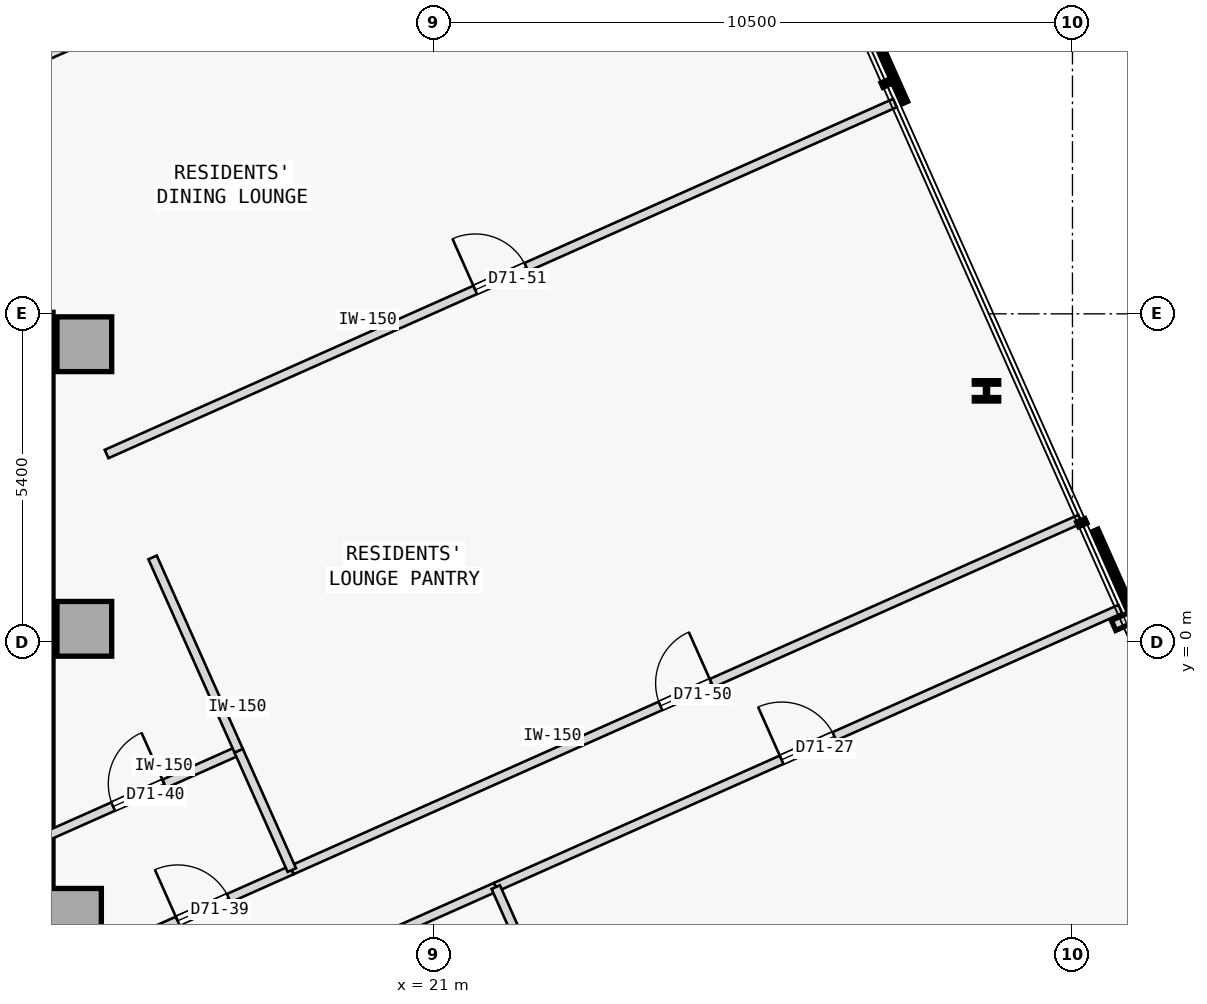
"""IFC4 building model, lengths in metres.
Left out: names, types, materials, properties, quantities, classifications, styles, units other than length and angle.
Written with IfcOpenShell. Run it as: python <this file> out.ifc"""

import sys

from ifc_helpers import new_model, si_unit, direction, frame, frame_2d, origin, origin_2d, place, context, subcontext, project, spatial, rectangle, i_section, extrude, element, fill, save


model = new_model("IFC4")
c1 = context("Model", 3, precision=1e-05, world=origin(), true_north=direction((0.0, 1.0)))
c2 = subcontext(c1, "Body", "Model", "MODEL_VIEW")
j1 = project(units=[si_unit("LENGTHUNIT", "METRE"), si_unit("PLANEANGLEUNIT", "RADIAN")], contexts=[c1])
p1 = place(None, origin())
s1 = spatial("IfcSite", under=j1, at=p1, CompositionType="ELEMENT")
p2 = place(p1, origin())
s2 = spatial("IfcBuilding", under=s1, at=p2, CompositionType="ELEMENT")
p3 = place(p2, frame((0.0, 0.0, 265.55)))
s3 = spatial("IfcBuildingStorey", under=s2, at=p3, CompositionType="ELEMENT", Elevation=265.55)
for number, where, z_axis, x_axis in (
    (1, (15.25, 4.9, 0.0), (0.0, 0.0, 1.0), (1.0, 0.0, 0.0)),
    (2, (15.25, 0.22, 0.0), (0.0, 0.0, 1.0), (1.0, 0.0, 0.0)),
    (3, (15.08, -4.5, 0.0), (0.0, 0.0, 1.0), (1.0, 0.0, 0.0)),
):
    element("IfcColumn", number, at=place(p3, frame(where, z_axis=z_axis, x_axis=x_axis)), inside=s3, PredefinedType="COLUMN", context=c2, shape_type="SweptSolid", body=[
        extrude(rectangle(XDim=0.9, YDim=0.9, at=origin_2d()), origin(), (0.0, 0.0, 1.0), 3.35),
    ])
p4 = place(p3, frame((14.56, -5.425, 0.0), z_axis=(0.0, 0.0, 1.0), x_axis=(0.0, 1.0, 0.0)))
e4 = element("IfcWall", 4, at=p4, inside=s3, PredefinedType="SHEAR", context=c2, shape_type="SweptSolid", body=[
    extrude(rectangle(XDim=10.85, YDim=0.35, at=frame_2d((5.425, 0.0))), origin(), (0.0, 0.0, 1.0), 3.125),
])
p5 = place(p3, frame((30.086, 4.133, 0.0), z_axis=(0.0, 0.0, 1.0), x_axis=(1.0, 0.0, 0.0)))
e5 = element("IfcColumn", 5, at=p5, inside=s3, PredefinedType="COLUMN", context=c2, shape_type="SweptSolid", body=[
    extrude(i_section(OverallWidth=0.401, OverallDepth=0.335, WebThickness=0.036, FlangeThickness=0.058, FilletRadius=0.015, at=origin_2d()), origin(), (0.0, 0.0, 1.0), 3.35),
])
p6 = place(p3, frame((22.016, -4.027, 0.0), z_axis=(0.0, 0.0, 1.0), x_axis=(0.913548968583, 0.406728757282, 0.0)))
e6 = element("IfcWall", 6, at=p6, inside=s3, PredefinedType="PARTITIONING", context=c2, shape_type="SweptSolid", body=[
    extrude(rectangle(XDim=11.242, YDim=0.15, at=frame_2d((5.621, 0.0))), origin(), (0.0, 0.0, 1.0), 3.125),
])
p7 = place(p6, frame((5.146, 0.0, 0.0)))
e7 = element("IfcOpeningElement", 7, at=p7, cuts=e6, PredefinedType="OPENING", context=c2, shape_type="SweptSolid", body=[
    extrude(rectangle(XDim=0.95, YDim=2.15, at=frame_2d((0.475, 1.075))), frame((0.0, 0.085, 0.0), z_axis=(0.0, -1.0, 0.0), x_axis=(1.0, 0.0, 0.0)), (0.0, 0.0, 1.0), 0.17),
])
p8 = place(p3, frame((18.818, -5.451, 0.0), z_axis=(0.0, 0.0, 1.0), x_axis=(0.913538066796, 0.406753242783, 0.0)))
e8 = element("IfcWall", 8, at=p8, inside=s3, PredefinedType="PARTITIONING", context=c2, shape_type="SweptSolid", body=[
    extrude(rectangle(XDim=3.5, YDim=0.15, at=frame_2d((1.75, 0.0))), origin(), (0.0, 0.0, 1.0), 3.125),
])
p9 = place(p3, frame((14.5, -5.6, 0.0), z_axis=(0.0, 0.0, 1.0), x_axis=(0.913550607208, 0.406725076766, 0.0)))
e9 = element("IfcWall", 9, at=p9, inside=s3, PredefinedType="PARTITIONING", context=c2, shape_type="SweptSolid", body=[
    extrude(rectangle(XDim=4.556, YDim=0.15, at=frame_2d((2.278, 0.0))), origin(), (0.0, 0.0, 1.0), 3.125),
])
p10 = place(p9, frame((2.501, 0.0, 0.0)))
e10 = element("IfcOpeningElement", 10, at=p10, cuts=e9, PredefinedType="OPENING", context=c2, shape_type="SweptSolid", body=[
    extrude(rectangle(XDim=0.92, YDim=2.15, at=frame_2d((0.46, 1.075))), frame((0.0, 0.085, 0.0), z_axis=(0.0, -1.0, 0.0), x_axis=(1.0, 0.0, 0.0)), (0.0, 0.0, 1.0), 0.17),
])
p11 = place(p3, frame((18.662, -3.747, 0.0), z_axis=(0.0, 0.0, 1.0), x_axis=(0.913544622417, 0.406738519018, 0.0)))
e11 = element("IfcWall", 11, at=p11, inside=s3, PredefinedType="PARTITIONING", context=c2, shape_type="SweptSolid", body=[
    extrude(rectangle(XDim=14.192, YDim=0.15, at=frame_2d((7.096, 0.0))), origin(), (0.0, 0.0, 1.0), 3.125),
])
p12 = place(p11, frame((6.636, 0.0, 0.0)))
e12 = element("IfcOpeningElement", 12, at=p12, cuts=e11, PredefinedType="OPENING", context=c2, shape_type="SweptSolid", body=[
    extrude(rectangle(XDim=0.92, YDim=2.15, at=frame_2d((0.46, 1.075))), frame((0.0, 0.085, 0.0), z_axis=(0.0, -1.0, 0.0), x_axis=(1.0, 0.0, 0.0)), (0.0, 0.0, 1.0), 0.17),
])
p13 = place(p3, frame((22.911, -6.037, 0.0), z_axis=(0.0, 0.0, 1.0), x_axis=(-0.40677666873, 0.913527636022, 0.0)))
e13 = element("IfcWall", 13, at=p13, inside=s3, PredefinedType="PARTITIONING", context=c2, shape_type="SweptSolid", body=[
    extrude(rectangle(XDim=2.2, YDim=0.15, at=frame_2d((1.1, 0.0))), origin(), (0.0, 0.0, 1.0), 3.125),
])
p14 = place(p3, frame((14.5, -3.248, 0.0), z_axis=(0.0, 0.0, 1.0), x_axis=(0.913542803573, 0.40674260416, 0.0)))
e14 = element("IfcWall", 14, at=p14, inside=s3, PredefinedType="PARTITIONING", context=c2, shape_type="SweptSolid", body=[
    extrude(rectangle(XDim=3.599, YDim=0.15, at=frame_2d((1.8, 0.0))), origin(), (0.0, 0.0, 1.0), 3.125),
])
p15 = place(p14, frame((1.34, 0.0, 0.0)))
e15 = element("IfcOpeningElement", 15, at=p15, cuts=e14, PredefinedType="OPENING", context=c2, shape_type="SweptSolid", body=[
    extrude(rectangle(XDim=0.92, YDim=2.15, at=frame_2d((0.46, 1.075))), frame((0.0, 0.085, 0.0), z_axis=(0.0, -1.0, 0.0), x_axis=(1.0, 0.0, 0.0)), (0.0, 0.0, 1.0), 0.17),
])
p16 = place(p3, frame((18.662, -3.747, 0.0), z_axis=(0.0, 0.0, 1.0), x_axis=(-0.406686481677, 0.913567789286, 0.0)))
e16 = element("IfcWall", 16, at=p16, inside=s3, PredefinedType="PARTITIONING", context=c2, shape_type="SweptSolid", body=[
    extrude(rectangle(XDim=2.149, YDim=0.15, at=frame_2d((1.075, 0.0))), origin(), (0.0, 0.0, 1.0), 3.125),
])
p17 = place(p3, frame((17.788, -1.784, 0.0), z_axis=(0.0, 0.0, 1.0), x_axis=(-0.40673740295, 0.913545119324, 0.0)))
e17 = element("IfcWall", 17, at=p17, inside=s3, PredefinedType="PARTITIONING", context=c2, shape_type="SweptSolid", body=[
    extrude(rectangle(XDim=3.479, YDim=0.15, at=frame_2d((1.74, 0.0))), origin(), (0.0, 0.0, 1.0), 3.125),
])
p18 = place(p3, frame((15.616, 3.094, 0.0), z_axis=(0.0, 0.0, 1.0), x_axis=(0.913551014388, 0.406724162191, 0.0)))
e18 = element("IfcWall", 18, at=p18, inside=s3, PredefinedType="PARTITIONING", context=c2, shape_type="SweptSolid", body=[
    extrude(rectangle(XDim=14.192, YDim=0.15, at=frame_2d((7.096, 0.0))), origin(), (0.0, 0.0, 1.0), 3.125),
])
p19 = place(p18, frame((6.636, 0.0, 0.0)))
e19 = element("IfcOpeningElement", 19, at=p19, cuts=e18, PredefinedType="OPENING", context=c2, shape_type="SweptSolid", body=[
    extrude(rectangle(XDim=0.92, YDim=2.15, at=frame_2d((0.46, 1.075))), frame((0.0, 0.085, 0.0), z_axis=(0.0, -1.0, 0.0), x_axis=(1.0, 0.0, 0.0)), (0.0, 0.0, 1.0), 0.17),
])
p20 = place(p3, frame((13.018, 8.93, 0.0), z_axis=(0.0, 0.0, 1.0), x_axis=(0.913551014388, 0.406724162191, 0.0)))
e20 = element("IfcWall", 20, at=p20, inside=s3, PredefinedType="PARTITIONING", context=c2, shape_type="SweptSolid", body=[
    extrude(rectangle(XDim=14.192, YDim=0.15, at=frame_2d((7.096, 0.0))), origin(), (0.0, 0.0, 1.0), 3.125),
])
p21 = place(p20, frame((6.636, 0.0, 0.0)))
e21 = element("IfcOpeningElement", 21, at=p21, cuts=e20, PredefinedType="OPENING", context=c2, shape_type="SweptSolid", body=[
    extrude(rectangle(XDim=0.92, YDim=2.15, at=frame_2d((0.46, 1.075))), frame((0.0, 0.085, 0.0), z_axis=(0.0, -1.0, 0.0), x_axis=(1.0, 0.0, 0.0)), (0.0, 0.0, 1.0), 0.17),
])
p22 = place(p7, origin())
e22 = element("IfcDoor", 22, at=p22, inside=s3, OperationType="SINGLE_SWING_LEFT", PredefinedType="DOOR", context=c2, shape_type="SweptSolid", body=[
    extrude(rectangle(XDim=0.95, YDim=2.15, at=frame_2d((0.475, 1.075))), frame((0.0, 0.025, 0.0), z_axis=(0.0, -1.0, 0.0), x_axis=(1.0, 0.0, 0.0)), (0.0, 0.0, 1.0), 0.05),
])
fill(e7, e22)
p23 = place(p10, origin())
e23 = element("IfcDoor", 23, at=p23, inside=s3, OperationType="SINGLE_SWING_LEFT", PredefinedType="DOOR", context=c2, shape_type="SweptSolid", body=[
    extrude(rectangle(XDim=0.92, YDim=2.15, at=frame_2d((0.46, 1.075))), frame((0.0, 0.025, 0.0), z_axis=(0.0, -1.0, 0.0), x_axis=(1.0, 0.0, 0.0)), (0.0, 0.0, 1.0), 0.05),
])
fill(e10, e23)
p24 = place(p15, origin())
e24 = element("IfcDoor", 24, at=p24, inside=s3, OperationType="SINGLE_SWING_RIGHT", PredefinedType="DOOR", context=c2, shape_type="SweptSolid", body=[
    extrude(rectangle(XDim=0.92, YDim=2.15, at=frame_2d((0.46, 1.075))), frame((0.0, 0.025, 0.0), z_axis=(0.0, -1.0, 0.0), x_axis=(1.0, 0.0, 0.0)), (0.0, 0.0, 1.0), 0.05),
])
fill(e15, e24)
p25 = place(p12, origin())
e25 = element("IfcDoor", 25, at=p25, inside=s3, OperationType="SINGLE_SWING_RIGHT", PredefinedType="DOOR", context=c2, shape_type="SweptSolid", body=[
    extrude(rectangle(XDim=0.92, YDim=2.15, at=frame_2d((0.46, 1.075))), frame((0.0, 0.025, 0.0), z_axis=(0.0, -1.0, 0.0), x_axis=(1.0, 0.0, 0.0)), (0.0, 0.0, 1.0), 0.05),
])
fill(e12, e25)
p26 = place(p19, origin())
e26 = element("IfcDoor", 26, at=p26, inside=s3, OperationType="SINGLE_SWING_LEFT", PredefinedType="DOOR", context=c2, shape_type="SweptSolid", body=[
    extrude(rectangle(XDim=0.92, YDim=2.15, at=frame_2d((0.46, 1.075))), frame((0.0, 0.025, 0.0), z_axis=(0.0, -1.0, 0.0), x_axis=(1.0, 0.0, 0.0)), (0.0, 0.0, 1.0), 0.05),
])
fill(e19, e26)
save(model, sys.argv[1])
